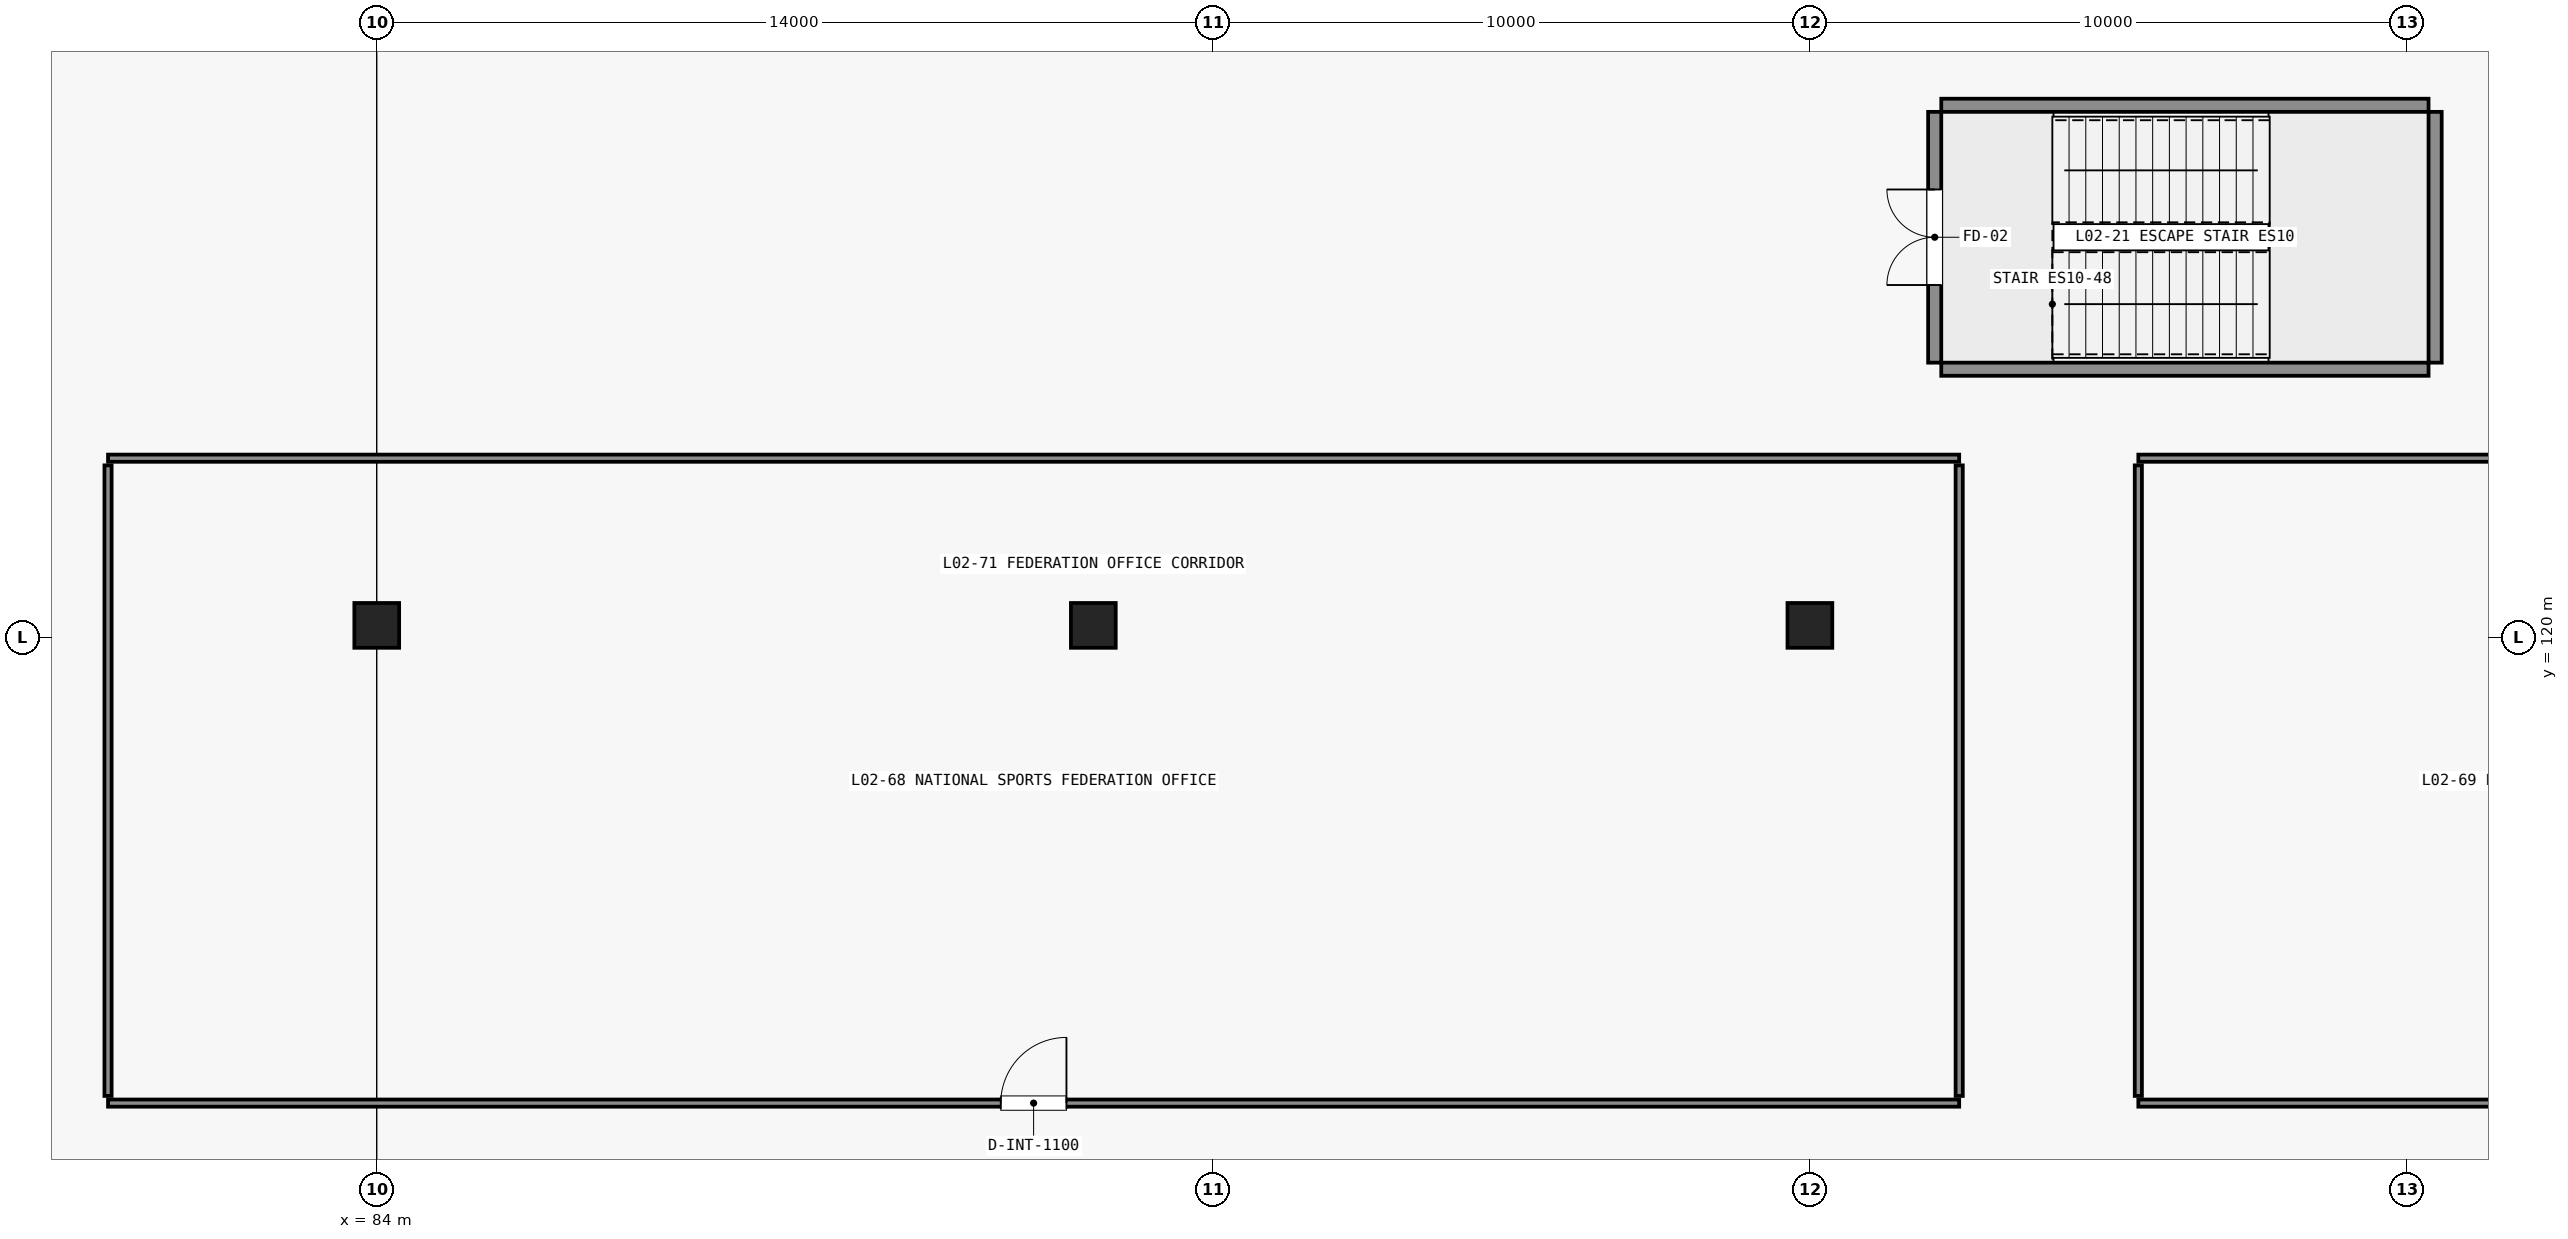
"""IFC4 building model, lengths in metres.
Left out: names, types, materials, properties, quantities, classifications, styles, units other than length and angle.
Written with IfcOpenShell. Run it as: python <this file> out.ifc"""

import sys

from ifc_helpers import new_model, si_unit, direction, frame, frame_2d, origin, origin_2d, place, context, subcontext, project, spatial, rectangle, extrude, element, fill, save


model = new_model("IFC4")
c1 = context("Model", 3, precision=1e-05, world=origin(), true_north=direction((0.0, 1.0)))
c2 = subcontext(c1, "Body", "Model", "MODEL_VIEW")
j1 = project(units=[si_unit("LENGTHUNIT", "METRE"), si_unit("PLANEANGLEUNIT", "RADIAN")], contexts=[c1])
p1 = place(None, origin())
s1 = spatial("IfcSite", under=j1, at=p1, CompositionType="ELEMENT")
p2 = place(p1, origin())
s2 = spatial("IfcBuilding", under=s1, at=p2, CompositionType="ELEMENT")
p3 = place(p2, frame((0.0, 0.0, 11.4)))
s3 = spatial("IfcBuildingStorey", under=s2, at=p3, CompositionType="ELEMENT", Elevation=11.4)
for number, where, z_axis, x_axis in (
    (1, (84.0, 120.2, 0.0), (0.0, 0.0, 1.0), (1.0, 0.0, 0.0)),
    (2, (96.0, 120.2, 0.0), (0.0, 0.0, 1.0), (1.0, 0.0, 0.0)),
    (3, (108.0, 120.2, 0.0), (0.0, 0.0, 1.0), (1.0, 0.0, 0.0)),
):
    element("IfcColumn", number, at=place(p3, frame(where, z_axis=z_axis, x_axis=x_axis)), inside=s3, PredefinedType="COLUMN", context=c2, shape_type="SweptSolid", body=[
        extrude(rectangle(XDim=0.75, YDim=0.75, at=origin_2d()), origin(), (0.0, 0.0, 1.0), 4.8),
    ])
for number, where, z_axis, x_axis in (
    (4, (110.2, 124.49, 0.0), (0.0, 0.0, 1.0), (1.0, 0.0, 0.0)),
    (5, (110.2, 128.91, 0.0), (0.0, 0.0, 1.0), (1.0, 0.0, 0.0)),
):
    element("IfcWall", number, at=place(p3, frame(where, z_axis=z_axis, x_axis=x_axis)), inside=s3, PredefinedType="SHEAR", context=c2, shape_type="SweptSolid", body=[
        extrude(rectangle(XDim=8.16, YDim=0.22, at=frame_2d((4.08, 0.0))), origin(), (0.0, 0.0, 1.0), 4.8),
    ])
p4 = place(p3, frame((110.09, 124.6, 0.0), z_axis=(0.0, 0.0, 1.0), x_axis=(0.0, 1.0, 0.0)))
e6 = element("IfcWall", 6, at=p4, inside=s3, PredefinedType="SHEAR", context=c2, shape_type="SweptSolid", body=[
    extrude(rectangle(XDim=4.2, YDim=0.22, at=frame_2d((2.1, 0.0))), origin(), (0.0, 0.0, 1.0), 4.8),
])
p5 = place(p4, frame((1.3, 0.0, 0.0)))
e7 = element("IfcOpeningElement", 7, at=p5, cuts=e6, PredefinedType="OPENING", context=c2, shape_type="SweptSolid", body=[
    extrude(rectangle(XDim=1.6, YDim=2.2, at=frame_2d((0.8, 1.1))), frame((0.0, 0.12, 0.0), z_axis=(0.0, -1.0, 0.0), x_axis=(1.0, 0.0, 0.0)), (0.0, 0.0, 1.0), 0.24),
])
p6 = place(p3, frame((118.47, 124.6, 0.0), z_axis=(0.0, 0.0, 1.0), x_axis=(0.0, 1.0, 0.0)))
e8 = element("IfcWall", 8, at=p6, inside=s3, PredefinedType="SHEAR", context=c2, shape_type="SweptSolid", body=[
    extrude(rectangle(XDim=4.2, YDim=0.22, at=frame_2d((2.1, 0.0))), origin(), (0.0, 0.0, 1.0), 4.8),
])
p7 = place(p3, frame((79.5, 112.2, 0.0), z_axis=(0.0, 0.0, 1.0), x_axis=(1.0, 0.0, 0.0)))
e9 = element("IfcWall", 9, at=p7, inside=s3, PredefinedType="PARTITIONING", context=c2, shape_type="SweptSolid", body=[
    extrude(rectangle(XDim=31.0, YDim=0.12, at=frame_2d((15.5, 0.0))), origin(), (0.0, 0.0, 1.0), 3.838),
])
p8 = place(p7, frame((14.95, 0.0, 0.0)))
e10 = element("IfcOpeningElement", 10, at=p8, cuts=e9, PredefinedType="OPENING", context=c2, shape_type="SweptSolid", body=[
    extrude(rectangle(XDim=1.1, YDim=2.2, at=frame_2d((0.55, 1.1))), frame((0.0, 0.07, 0.0), z_axis=(0.0, -1.0, 0.0), x_axis=(1.0, 0.0, 0.0)), (0.0, 0.0, 1.0), 0.14),
])
p9 = place(p3, frame((79.5, 123.0, 0.0), z_axis=(0.0, 0.0, 1.0), x_axis=(1.0, 0.0, 0.0)))
e11 = element("IfcWall", 11, at=p9, inside=s3, PredefinedType="PARTITIONING", context=c2, shape_type="SweptSolid", body=[
    extrude(rectangle(XDim=31.0, YDim=0.12, at=frame_2d((15.5, 0.0))), origin(), (0.0, 0.0, 1.0), 3.838),
])
for number, where, z_axis, x_axis in (
    (12, (79.5, 112.32, 0.0), (0.0, 0.0, 1.0), (0.0, 1.0, 0.0)),
    (13, (110.5, 112.32, 0.0), (0.0, 0.0, 1.0), (0.0, 1.0, 0.0)),
):
    element("IfcWall", number, at=place(p3, frame(where, z_axis=z_axis, x_axis=x_axis)), inside=s3, PredefinedType="PARTITIONING", context=c2, shape_type="SweptSolid", body=[
        extrude(rectangle(XDim=10.56, YDim=0.12, at=frame_2d((5.28, 0.0))), origin(), (0.0, 0.0, 1.0), 3.838),
    ])
p10 = place(p3, frame((113.5, 112.2, 0.0), z_axis=(0.0, 0.0, 1.0), x_axis=(1.0, 0.0, 0.0)))
e14 = element("IfcWall", 14, at=p10, inside=s3, PredefinedType="PARTITIONING", context=c2, shape_type="SweptSolid", body=[
    extrude(rectangle(XDim=30.5, YDim=0.12, at=frame_2d((15.25, 0.0))), origin(), (0.0, 0.0, 1.0), 3.838),
])
p11 = place(p10, frame((14.7, 0.0, 0.0)))
e15 = element("IfcOpeningElement", 15, at=p11, cuts=e14, PredefinedType="OPENING", context=c2, shape_type="SweptSolid", body=[
    extrude(rectangle(XDim=1.1, YDim=2.2, at=frame_2d((0.55, 1.1))), frame((0.0, 0.07, 0.0), z_axis=(0.0, -1.0, 0.0), x_axis=(1.0, 0.0, 0.0)), (0.0, 0.0, 1.0), 0.14),
])
p12 = place(p3, frame((113.5, 123.0, 0.0), z_axis=(0.0, 0.0, 1.0), x_axis=(1.0, 0.0, 0.0)))
e16 = element("IfcWall", 16, at=p12, inside=s3, PredefinedType="PARTITIONING", context=c2, shape_type="SweptSolid", body=[
    extrude(rectangle(XDim=30.5, YDim=0.12, at=frame_2d((15.25, 0.0))), origin(), (0.0, 0.0, 1.0), 3.838),
])
p13 = place(p3, frame((113.5, 112.32, 0.0), z_axis=(0.0, 0.0, 1.0), x_axis=(0.0, 1.0, 0.0)))
e17 = element("IfcWall", 17, at=p13, inside=s3, PredefinedType="PARTITIONING", context=c2, shape_type="SweptSolid", body=[
    extrude(rectangle(XDim=10.56, YDim=0.12, at=frame_2d((5.28, 0.0))), origin(), (0.0, 0.0, 1.0), 3.838),
])
p14 = place(p5, origin())
e18 = element("IfcDoor", 18, at=p14, inside=s3, OperationType="DOUBLE_DOOR_SINGLE_SWING", PredefinedType="DOOR", context=c2, shape_type="SweptSolid", body=[
    extrude(rectangle(XDim=1.6, YDim=2.2, at=frame_2d((0.8, 1.1))), frame((0.0, 0.025, 0.0), z_axis=(0.0, -1.0, 0.0), x_axis=(1.0, 0.0, 0.0)), (0.0, 0.0, 1.0), 0.05),
])
fill(e7, e18)
p15 = place(p8, origin())
e19 = element("IfcDoor", 19, at=p15, inside=s3, OperationType="SINGLE_SWING_RIGHT", PredefinedType="DOOR", context=c2, shape_type="SweptSolid", body=[
    extrude(rectangle(XDim=1.1, YDim=2.2, at=frame_2d((0.55, 1.1))), frame((0.0, 0.025, 0.0), z_axis=(0.0, -1.0, 0.0), x_axis=(1.0, 0.0, 0.0)), (0.0, 0.0, 1.0), 0.05),
])
fill(e10, e19)
save(model, sys.argv[1])
